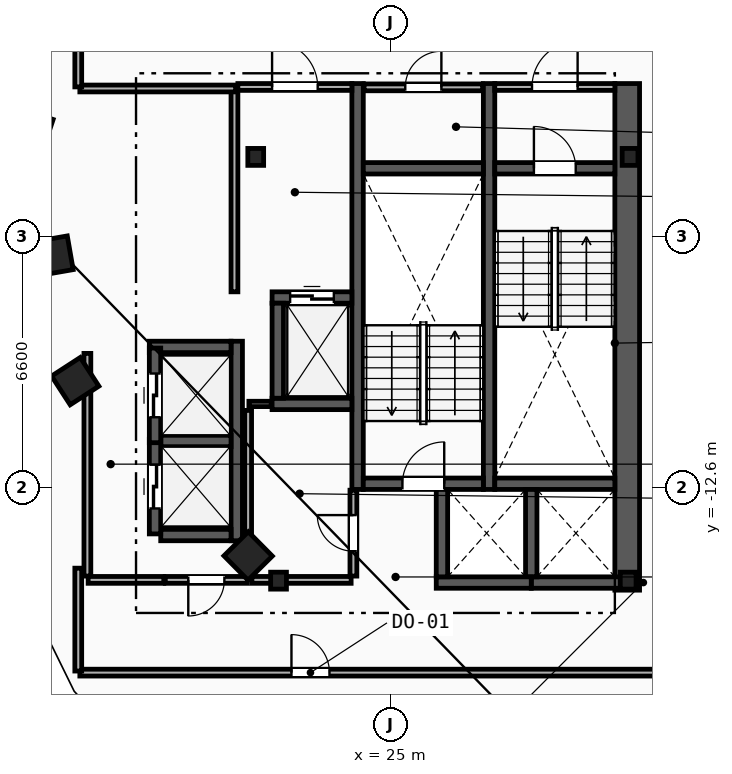
"""IFC4 building model, lengths in metres.
Left out: names, types, materials, properties, quantities, classifications, styles, units other than length and angle.
Written with IfcOpenShell. Run it as: python <this file> out.ifc"""

import sys

from ifc_helpers import new_model, si_unit, direction, frame, frame_2d, origin, origin_2d, place, context, subcontext, project, spatial, rectangle, i_section, extrude, element, fill, save


model = new_model("IFC4")
c1 = context("Model", 3, precision=1e-05, world=origin(), true_north=direction((0.0, 1.0)))
c2 = subcontext(c1, "Body", "Model", "MODEL_VIEW")
j1 = project(units=[si_unit("LENGTHUNIT", "METRE"), si_unit("PLANEANGLEUNIT", "RADIAN")], contexts=[c1])
p1 = place(None, origin())
s1 = spatial("IfcSite", under=j1, at=p1, CompositionType="ELEMENT")
p2 = place(p1, origin())
s2 = spatial("IfcBuilding", under=s1, at=p2, CompositionType="ELEMENT")
p3 = place(p2, frame((0.0, 0.0, 209.8)))
s3 = spatial("IfcBuildingStorey", under=s2, at=p3, CompositionType="ELEMENT", Elevation=209.8)
for number, where, z_axis, x_axis in (
    (1, (31.3, -3.9, 0.0), (0.0, 0.0, 1.0), (1.0, 0.0, 0.0)),
    (2, (21.45, -3.9, 0.0), (0.0, 0.0, 1.0), (1.0, 0.0, 0.0)),
    (3, (22.05, -15.05, 0.0), (0.0, 0.0, 1.0), (1.0, 0.0, 0.0)),
    (4, (31.25, -15.05, 0.0), (0.0, 0.0, 1.0), (1.0, 0.0, 0.0)),
):
    element("IfcColumn", number, at=place(p3, frame(where, z_axis=z_axis, x_axis=x_axis)), inside=s3, PredefinedType="COLUMN", context=c2, shape_type="SweptSolid", body=[
        extrude(i_section(OverallWidth=0.416, OverallDepth=0.446, WebThickness=0.039, FlangeThickness=0.063, FilletRadius=0.018, at=origin_2d()), origin(), (0.0, 0.0, 1.0), 3.6),
    ])
for number, where, z_axis, x_axis in (
    (5, (15.55, -3.2, 0.0), (0.0, 0.0, 1.0), (-0.315, -0.949, 0.0)),
    (6, (16.125, -6.5, 0.0), (0.0, 0.0, 1.0), (0.172, -0.985, 0.0)),
    (7, (16.7, -9.8, 0.0), (0.0, 0.0, 1.0), (0.544, -0.839, 0.0)),
    (8, (21.25, -14.4, 0.0), (0.0, 0.0, 1.0), (0.703, -0.711, 0.0)),
):
    element("IfcColumn", number, at=place(p3, frame(where, z_axis=z_axis, x_axis=x_axis)), inside=s3, PredefinedType="COLUMN", context=c2, shape_type="SweptSolid", body=[
        extrude(rectangle(XDim=0.9, YDim=0.9, at=origin_2d()), origin(), (0.0, 0.0, 1.0), 3.6),
    ])
p4 = place(p3, frame((31.225, -15.3, 0.0), z_axis=(0.0, 0.0, 1.0), x_axis=(0.0, 1.0, 0.0)))
e9 = element("IfcWall", 9, at=p4, inside=s3, PredefinedType="SHEAR", context=c2, shape_type="SweptSolid", body=[
    extrude(rectangle(XDim=13.33, YDim=0.65, at=frame_2d((6.665, 0.0))), origin(), (0.0, 0.0, 1.0), 3.34),
])
for number, where, z_axis, x_axis in (
    (10, (27.59, -12.65, 0.0), (0.0, 0.0, 1.0), (0.0, 1.0, 0.0)),
    (11, (24.13, -12.65, 0.0), (0.0, 0.0, 1.0), (0.0, 1.0, 0.0)),
):
    element("IfcWall", number, at=place(p3, frame(where, z_axis=z_axis, x_axis=x_axis)), inside=s3, PredefinedType="SHEAR", context=c2, shape_type="SweptSolid", body=[
        extrude(rectangle(XDim=10.68, YDim=0.3, at=frame_2d((5.34, 0.0))), origin(), (0.0, 0.0, 1.0), 3.34),
    ])
p5 = place(p3, frame((27.74, -4.2, 0.0), z_axis=(0.0, 0.0, 1.0), x_axis=(1.0, 0.0, 0.0)))
e12 = element("IfcWall", 12, at=p5, inside=s3, PredefinedType="SHEAR", context=c2, shape_type="SweptSolid", body=[
    extrude(rectangle(XDim=3.16, YDim=0.3, at=frame_2d((1.58, 0.0))), origin(), (0.0, 0.0, 1.0), 3.34),
])
p6 = place(p5, frame((1.03, 0.0, 0.0)))
e13 = element("IfcOpeningElement", 13, at=p6, cuts=e12, PredefinedType="OPENING", context=c2, shape_type="SweptSolid", body=[
    extrude(rectangle(XDim=1.1, YDim=2.15, at=frame_2d((0.55, 1.075))), frame((0.0, 0.16, 0.0), z_axis=(0.0, -1.0, 0.0), x_axis=(1.0, 0.0, 0.0)), (0.0, 0.0, 1.0), 0.32),
])
p7 = place(p3, frame((27.74, -12.5, 0.0), z_axis=(0.0, 0.0, 1.0), x_axis=(1.0, 0.0, 0.0)))
e14 = element("IfcWall", 14, at=p7, inside=s3, PredefinedType="SHEAR", context=c2, shape_type="SweptSolid", body=[
    extrude(rectangle(XDim=3.16, YDim=0.3, at=frame_2d((1.58, 0.0))), origin(), (0.0, 0.0, 1.0), 3.34),
])
p8 = place(p3, frame((24.28, -12.5, 0.0), z_axis=(0.0, 0.0, 1.0), x_axis=(1.0, 0.0, 0.0)))
e15 = element("IfcWall", 15, at=p8, inside=s3, PredefinedType="SHEAR", context=c2, shape_type="SweptSolid", body=[
    extrude(rectangle(XDim=3.16, YDim=0.3, at=frame_2d((1.58, 0.0))), origin(), (0.0, 0.0, 1.0), 3.34),
])
p9 = place(p8, frame((1.03, 0.0, 0.0)))
e16 = element("IfcOpeningElement", 16, at=p9, cuts=e15, PredefinedType="OPENING", context=c2, shape_type="SweptSolid", body=[
    extrude(rectangle(XDim=1.1, YDim=2.15, at=frame_2d((0.55, 1.075))), frame((0.0, 0.16, 0.0), z_axis=(0.0, -1.0, 0.0), x_axis=(1.0, 0.0, 0.0)), (0.0, 0.0, 1.0), 0.32),
])
p10 = place(p3, frame((24.28, -4.2, 0.0), z_axis=(0.0, 0.0, 1.0), x_axis=(1.0, 0.0, 0.0)))
e17 = element("IfcWall", 17, at=p10, inside=s3, PredefinedType="SHEAR", context=c2, shape_type="SweptSolid", body=[
    extrude(rectangle(XDim=3.16, YDim=0.3, at=frame_2d((1.58, 0.0))), origin(), (0.0, 0.0, 1.0), 3.34),
])
p11 = place(p3, frame((20.89, -7.45, 0.0), z_axis=(0.0, 0.0, 1.0), x_axis=(0.0, 1.0, 0.0)))
e18 = element("IfcWall", 18, at=p11, inside=s3, PredefinedType="PARTITIONING", context=c2, shape_type="SweptSolid", body=[
    extrude(rectangle(XDim=5.3, YDim=0.18, at=frame_2d((2.65, 0.0))), origin(), (0.0, 0.0, 1.0), 3.34),
])
p12 = place(p3, frame((20.98, -2.06, 0.0), z_axis=(0.0, 0.0, 1.0), x_axis=(1.0, 0.0, 0.0)))
e19 = element("IfcWall", 19, at=p12, inside=s3, PredefinedType="PARTITIONING", context=c2, shape_type="SweptSolid", body=[
    extrude(rectangle(XDim=3.0, YDim=0.18, at=frame_2d((1.5, 0.0))), origin(), (0.0, 0.0, 1.0), 3.34),
])
p13 = place(p12, frame((0.9, 0.0, 0.0)))
e20 = element("IfcOpeningElement", 20, at=p13, cuts=e19, PredefinedType="OPENING", context=c2, shape_type="SweptSolid", body=[
    extrude(rectangle(XDim=1.2, YDim=2.15, at=frame_2d((0.6, 1.075))), frame((0.0, 0.1, 0.0), z_axis=(0.0, -1.0, 0.0), x_axis=(1.0, 0.0, 0.0)), (0.0, 0.0, 1.0), 0.2),
])
p14 = place(p3, frame((27.74, -2.06, 0.0), z_axis=(0.0, 0.0, 1.0), x_axis=(1.0, 0.0, 0.0)))
e21 = element("IfcWall", 21, at=p14, inside=s3, PredefinedType="PARTITIONING", context=c2, shape_type="SweptSolid", body=[
    extrude(rectangle(XDim=3.16, YDim=0.18, at=frame_2d((1.58, 0.0))), origin(), (0.0, 0.0, 1.0), 3.34),
])
p15 = place(p14, frame((0.98, 0.0, 0.0)))
e22 = element("IfcOpeningElement", 22, at=p15, cuts=e21, PredefinedType="OPENING", context=c2, shape_type="SweptSolid", body=[
    extrude(rectangle(XDim=1.2, YDim=2.15, at=frame_2d((0.6, 1.075))), frame((0.0, 0.1, 0.0), z_axis=(0.0, -1.0, 0.0), x_axis=(1.0, 0.0, 0.0)), (0.0, 0.0, 1.0), 0.2),
])
p16 = place(p3, frame((21.88, -7.6, 0.0), z_axis=(0.0, 0.0, 1.0), x_axis=(1.0, 0.0, 0.0)))
e23 = element("IfcWall", 23, at=p16, inside=s3, PredefinedType="SHEAR", context=c2, shape_type="SweptSolid", body=[
    extrude(rectangle(XDim=2.1, YDim=0.3, at=frame_2d((1.05, 0.0))), origin(), (0.0, 0.0, 1.0), 3.34),
])
p17 = place(p16, frame((0.475, 0.0, 0.0)))
e24 = element("IfcOpeningElement", 24, at=p17, cuts=e23, PredefinedType="OPENING", context=c2, shape_type="SweptSolid", body=[
    extrude(rectangle(XDim=1.15, YDim=2.2, at=frame_2d((0.575, 1.1))), frame((0.0, 0.16, 0.0), z_axis=(0.0, -1.0, 0.0), x_axis=(1.0, 0.0, 0.0)), (0.0, 0.0, 1.0), 0.32),
])
p18 = place(p3, frame((21.88, -10.4, 0.0), z_axis=(0.0, 0.0, 1.0), x_axis=(1.0, 0.0, 0.0)))
e25 = element("IfcWall", 25, at=p18, inside=s3, PredefinedType="SHEAR", context=c2, shape_type="SweptSolid", body=[
    extrude(rectangle(XDim=2.1, YDim=0.3, at=frame_2d((1.05, 0.0))), origin(), (0.0, 0.0, 1.0), 3.34),
])
for number, where, z_axis, x_axis in (
    (26, (22.03, -10.25, 0.0), (0.0, 0.0, 1.0), (0.0, 1.0, 0.0)),
    (27, (28.7, -15.1, 0.0), (0.0, 0.0, 1.0), (1.0, 0.0, 0.0)),
):
    element("IfcWall", number, at=place(p3, frame(where, z_axis=z_axis, x_axis=x_axis)), inside=s3, PredefinedType="SHEAR", context=c2, shape_type="SweptSolid", body=[
        extrude(rectangle(XDim=2.5, YDim=0.3, at=frame_2d((1.25, 0.0))), origin(), (0.0, 0.0, 1.0), 3.34),
    ])
p19 = place(p3, frame((28.7, -14.95, 0.0), z_axis=(0.0, 0.0, 1.0), x_axis=(0.0, 1.0, 0.0)))
e28 = element("IfcWall", 28, at=p19, inside=s3, PredefinedType="SHEAR", context=c2, shape_type="SweptSolid", body=[
    extrude(rectangle(XDim=2.3, YDim=0.3, at=frame_2d((1.15, 0.0))), origin(), (0.0, 0.0, 1.0), 3.34),
])
p20 = place(p3, frame((26.2, -15.1, 0.0), z_axis=(0.0, 0.0, 1.0), x_axis=(1.0, 0.0, 0.0)))
e29 = element("IfcWall", 29, at=p20, inside=s3, PredefinedType="SHEAR", context=c2, shape_type="SweptSolid", body=[
    extrude(rectangle(XDim=2.5, YDim=0.3, at=frame_2d((1.25, 0.0))), origin(), (0.0, 0.0, 1.0), 3.34),
])
p21 = place(p3, frame((26.35, -14.95, 0.0), z_axis=(0.0, 0.0, 1.0), x_axis=(0.0, 1.0, 0.0)))
e30 = element("IfcWall", 30, at=p21, inside=s3, PredefinedType="SHEAR", context=c2, shape_type="SweptSolid", body=[
    extrude(rectangle(XDim=2.3, YDim=0.3, at=frame_2d((1.15, 0.0))), origin(), (0.0, 0.0, 1.0), 3.34),
])
p22 = place(p3, frame((20.95, -14.0, 0.0), z_axis=(0.0, 0.0, 1.0), x_axis=(0.0, 1.0, 0.0)))
e31 = element("IfcWall", 31, at=p22, inside=s3, PredefinedType="SHEAR", context=c2, shape_type="SweptSolid", body=[
    extrude(rectangle(XDim=5.25, YDim=0.3, at=frame_2d((2.625, 0.0))), origin(), (0.0, 0.0, 1.0), 3.34),
])
p23 = place(p3, frame((18.95, -13.85, 0.0), z_axis=(0.0, 0.0, 1.0), x_axis=(1.0, 0.0, 0.0)))
e32 = element("IfcWall", 32, at=p23, inside=s3, PredefinedType="SHEAR", context=c2, shape_type="SweptSolid", body=[
    extrude(rectangle(XDim=1.85, YDim=0.3, at=frame_2d((0.925, 0.0))), origin(), (0.0, 0.0, 1.0), 3.34),
])
p24 = place(p3, frame((18.65, -8.9, 0.0), z_axis=(0.0, 0.0, 1.0), x_axis=(1.0, 0.0, 0.0)))
e33 = element("IfcWall", 33, at=p24, inside=s3, PredefinedType="SHEAR", context=c2, shape_type="SweptSolid", body=[
    extrude(rectangle(XDim=2.15, YDim=0.3, at=frame_2d((1.075, 0.0))), origin(), (0.0, 0.0, 1.0), 3.34),
])
p25 = place(p3, frame((18.95, -11.375, 0.0), z_axis=(0.0, 0.0, 1.0), x_axis=(1.0, 0.0, 0.0)))
e34 = element("IfcWall", 34, at=p25, inside=s3, PredefinedType="SHEAR", context=c2, shape_type="SweptSolid", body=[
    extrude(rectangle(XDim=1.85, YDim=0.3, at=frame_2d((0.925, 0.0))), origin(), (0.0, 0.0, 1.0), 3.34),
])
p26 = place(p3, frame((18.8, -13.82, 0.0), z_axis=(0.0, 0.0, 1.0), x_axis=(0.0, 1.0, 0.0)))
e35 = element("IfcWall", 35, at=p26, inside=s3, PredefinedType="SHEAR", context=c2, shape_type="SweptSolid", body=[
    extrude(rectangle(XDim=2.49, YDim=0.3, at=frame_2d((1.245, 0.0))), origin(), (0.0, 0.0, 1.0), 3.34),
])
p27 = place(p26, frame((0.67, 0.0, 0.0)))
e36 = element("IfcOpeningElement", 36, at=p27, cuts=e35, PredefinedType="OPENING", context=c2, shape_type="SweptSolid", body=[
    extrude(rectangle(XDim=1.15, YDim=2.2, at=frame_2d((0.575, 1.1))), frame((0.0, 0.16, 0.0), z_axis=(0.0, -1.0, 0.0), x_axis=(1.0, 0.0, 0.0)), (0.0, 0.0, 1.0), 0.32),
])
p28 = place(p3, frame((18.8, -11.42, 0.0), z_axis=(0.0, 0.0, 1.0), x_axis=(0.0, 1.0, 0.0)))
e37 = element("IfcWall", 37, at=p28, inside=s3, PredefinedType="SHEAR", context=c2, shape_type="SweptSolid", body=[
    extrude(rectangle(XDim=2.49, YDim=0.3, at=frame_2d((1.245, 0.0))), origin(), (0.0, 0.0, 1.0), 3.34),
])
p29 = place(p28, frame((0.67, 0.0, 0.0)))
e38 = element("IfcOpeningElement", 38, at=p29, cuts=e37, PredefinedType="OPENING", context=c2, shape_type="SweptSolid", body=[
    extrude(rectangle(XDim=1.15, YDim=2.2, at=frame_2d((0.575, 1.1))), frame((0.0, 0.16, 0.0), z_axis=(0.0, -1.0, 0.0), x_axis=(1.0, 0.0, 0.0)), (0.0, 0.0, 1.0), 0.32),
])
p30 = place(p3, frame((17.02, -14.93, 0.0), z_axis=(0.0, 0.0, 1.0), x_axis=(0.0, 1.0, 0.0)))
e39 = element("IfcWall", 39, at=p30, inside=s3, PredefinedType="PARTITIONING", context=c2, shape_type="SweptSolid", body=[
    extrude(rectangle(XDim=5.86, YDim=0.18, at=frame_2d((2.93, 0.0))), origin(), (0.0, 0.0, 1.0), 3.34),
])
p31 = place(p3, frame((17.04, -15.03, 0.0), z_axis=(0.0, 0.0, 1.0), x_axis=(1.0, 0.0, 0.0)))
e40 = element("IfcWall", 40, at=p31, inside=s3, PredefinedType="PARTITIONING", context=c2, shape_type="SweptSolid", body=[
    extrude(rectangle(XDim=1.99, YDim=0.18, at=frame_2d((0.995, 0.0))), origin(), (0.0, 0.0, 1.0), 3.34),
])
p32 = place(p3, frame((21.23, -15.03, 0.0), z_axis=(0.0, 0.0, 1.0), x_axis=(-1.0, 0.0, 0.0)))
e41 = element("IfcWall", 41, at=p32, inside=s3, PredefinedType="PARTITIONING", context=c2, shape_type="SweptSolid", body=[
    extrude(rectangle(XDim=2.16, YDim=0.18, at=frame_2d((1.08, 0.0))), origin(), (0.0, 0.0, 1.0), 3.34),
])
p33 = place(p32, frame((0.605, 0.0, 0.0)))
e42 = element("IfcOpeningElement", 42, at=p33, cuts=e41, PredefinedType="OPENING", context=c2, shape_type="SweptSolid", body=[
    extrude(rectangle(XDim=0.95, YDim=2.1, at=frame_2d((0.475, 1.05))), frame((0.0, 0.1, 0.0), z_axis=(0.0, -1.0, 0.0), x_axis=(1.0, 0.0, 0.0)), (0.0, 0.0, 1.0), 0.2),
])
p34 = place(p3, frame((21.27, -10.4, 0.0), z_axis=(0.0, 0.0, 1.0), x_axis=(1.0, 0.0, 0.0)))
e43 = element("IfcWall", 43, at=p34, inside=s3, PredefinedType="PARTITIONING", context=c2, shape_type="SweptSolid", body=[
    extrude(rectangle(XDim=0.59, YDim=0.14, at=frame_2d((0.295, 0.0))), origin(), (0.0, 0.0, 1.0), 3.34),
])
p35 = place(p3, frame((21.25, -14.93, 0.0), z_axis=(0.0, 0.0, 1.0), x_axis=(0.0, 1.0, 0.0)))
e44 = element("IfcWall", 44, at=p35, inside=s3, PredefinedType="PARTITIONING", context=c2, shape_type="SweptSolid", body=[
    extrude(rectangle(XDim=4.36, YDim=0.18, at=frame_2d((2.18, 0.0))), origin(), (0.0, 0.0, 1.0), 3.34),
])
p36 = place(p3, frame((21.35, -15.03, 0.0), z_axis=(0.0, 0.0, 1.0), x_axis=(1.0, 0.0, 0.0)))
e45 = element("IfcWall", 45, at=p36, inside=s3, PredefinedType="PARTITIONING", context=c2, shape_type="SweptSolid", body=[
    extrude(rectangle(XDim=2.61, YDim=0.18, at=frame_2d((1.305, 0.0))), origin(), (0.0, 0.0, 1.0), 2.413),
])
p37 = place(p3, frame((24.3, -2.07, 0.0), z_axis=(0.0, 0.0, 1.0), x_axis=(1.0, 0.0, 0.0)))
e46 = element("IfcWall", 46, at=p37, inside=s3, PredefinedType="PARTITIONING", context=c2, shape_type="SweptSolid", body=[
    extrude(rectangle(XDim=3.12, YDim=0.18, at=frame_2d((1.56, 0.0))), origin(), (0.0, 0.0, 1.0), 3.34),
])
p38 = place(p37, frame((1.085, 0.0, 0.0)))
e47 = element("IfcOpeningElement", 47, at=p38, cuts=e46, PredefinedType="OPENING", context=c2, shape_type="SweptSolid", body=[
    extrude(rectangle(XDim=0.95, YDim=2.1, at=frame_2d((0.475, 1.05))), frame((0.0, 0.1, 0.0), z_axis=(0.0, -1.0, 0.0), x_axis=(1.0, 0.0, 0.0)), (0.0, 0.0, 1.0), 0.2),
])
p39 = place(p3, frame((24.02, -14.93, 0.0), z_axis=(0.0, 0.0, 1.0), x_axis=(0.0, 1.0, 0.0)))
e48 = element("IfcWall", 48, at=p39, inside=s3, PredefinedType="PARTITIONING", context=c2, shape_type="SweptSolid", body=[
    extrude(rectangle(XDim=2.26, YDim=0.18, at=frame_2d((1.13, 0.0))), origin(), (0.0, 0.0, 1.0), 3.34),
])
p40 = place(p39, frame((0.655, 0.0, 0.0)))
e49 = element("IfcOpeningElement", 49, at=p40, cuts=e48, PredefinedType="OPENING", context=c2, shape_type="SweptSolid", body=[
    extrude(rectangle(XDim=0.95, YDim=2.1, at=frame_2d((0.475, 1.05))), frame((0.0, 0.1, 0.0), z_axis=(0.0, -1.0, 0.0), x_axis=(1.0, 0.0, 0.0)), (0.0, 0.0, 1.0), 0.2),
])
p41 = place(p3, frame((16.822, -17.47, 0.0), z_axis=(0.0, 0.0, 1.0), x_axis=(1.0, 0.0, 0.0)))
e50 = element("IfcWall", 50, at=p41, inside=s3, PredefinedType="PARTITIONING", context=c2, shape_type="SweptSolid", body=[
    extrude(rectangle(XDim=16.807, YDim=0.18, at=frame_2d((8.403, 0.0))), origin(), (0.0, 0.0, 1.0), 3.34),
])
p42 = place(p41, frame((5.569, 0.0, 0.0)))
e51 = element("IfcOpeningElement", 51, at=p42, cuts=e50, PredefinedType="OPENING", context=c2, shape_type="SweptSolid", body=[
    extrude(rectangle(XDim=1.0, YDim=2.15, at=frame_2d((0.5, 1.075))), frame((0.0, 0.1, 0.0), z_axis=(0.0, -1.0, 0.0), x_axis=(1.0, 0.0, 0.0)), (0.0, 0.0, 1.0), 0.2),
])
p43 = place(p3, frame((16.822, -2.1, 0.0), z_axis=(0.0, 0.0, 1.0), x_axis=(1.0, 0.0, 0.0)))
e52 = element("IfcWall", 52, at=p43, inside=s3, PredefinedType="PARTITIONING", context=c2, shape_type="SweptSolid", body=[
    extrude(rectangle(XDim=4.098, YDim=0.18, at=frame_2d((2.049, 0.0))), origin(), (0.0, 0.0, 1.0), 3.34),
])
p44 = place(p3, frame((16.78, -14.721, 0.0), z_axis=(0.0, 0.0, 1.0), x_axis=(0.0, -1.0, 0.0)))
e53 = element("IfcWall", 53, at=p44, inside=s3, PredefinedType="PARTITIONING", context=c2, shape_type="SweptSolid", body=[
    extrude(rectangle(XDim=2.707, YDim=0.18, at=frame_2d((1.354, 0.0))), origin(), (0.0, 0.0, 1.0), 3.34),
])
p45 = place(p3, frame((16.78, 0.329, 0.0), z_axis=(0.0, 0.0, 1.0), x_axis=(0.0, -1.0, 0.0)))
e54 = element("IfcWall", 54, at=p45, inside=s3, PredefinedType="PARTITIONING", context=c2, shape_type="SweptSolid", body=[
    extrude(rectangle(XDim=2.387, YDim=0.18, at=frame_2d((1.194, 0.0))), origin(), (0.0, 0.0, 1.0), 3.34),
])
p46 = place(p6, origin())
e55 = element("IfcDoor", 55, at=p46, inside=s3, OperationType="SINGLE_SWING_LEFT", PredefinedType="DOOR", context=c2, shape_type="SweptSolid", body=[
    extrude(rectangle(XDim=1.1, YDim=2.15, at=frame_2d((0.55, 1.075))), frame((0.0, 0.025, 0.0), z_axis=(0.0, -1.0, 0.0), x_axis=(1.0, 0.0, 0.0)), (0.0, 0.0, 1.0), 0.05),
])
fill(e13, e55)
p47 = place(p9, origin())
e56 = element("IfcDoor", 56, at=p47, inside=s3, OperationType="SINGLE_SWING_RIGHT", PredefinedType="DOOR", context=c2, shape_type="SweptSolid", body=[
    extrude(rectangle(XDim=1.1, YDim=2.15, at=frame_2d((0.55, 1.075))), frame((0.0, 0.025, 0.0), z_axis=(0.0, -1.0, 0.0), x_axis=(1.0, 0.0, 0.0)), (0.0, 0.0, 1.0), 0.05),
])
fill(e16, e56)
p48 = place(p13, origin())
e57 = element("IfcDoor", 57, at=p48, inside=s3, OperationType="SINGLE_SWING_LEFT", PredefinedType="DOOR", context=c2, shape_type="SweptSolid", body=[
    extrude(rectangle(XDim=1.2, YDim=2.15, at=frame_2d((0.6, 1.075))), frame((0.0, 0.025, 0.0), z_axis=(0.0, -1.0, 0.0), x_axis=(1.0, 0.0, 0.0)), (0.0, 0.0, 1.0), 0.05),
])
fill(e20, e57)
p49 = place(p15, origin())
e58 = element("IfcDoor", 58, at=p49, inside=s3, OperationType="SINGLE_SWING_RIGHT", PredefinedType="DOOR", context=c2, shape_type="SweptSolid", body=[
    extrude(rectangle(XDim=1.2, YDim=2.15, at=frame_2d((0.6, 1.075))), frame((0.0, 0.025, 0.0), z_axis=(0.0, -1.0, 0.0), x_axis=(1.0, 0.0, 0.0)), (0.0, 0.0, 1.0), 0.05),
])
fill(e22, e58)
p50 = place(p17, origin())
e59 = element("IfcDoor", 59, at=p50, inside=s3, OperationType="SLIDING_TO_LEFT", PredefinedType="TRAPDOOR", context=c2, shape_type="SweptSolid", body=[
    extrude(rectangle(XDim=1.15, YDim=2.2, at=frame_2d((0.575, 1.1))), frame((0.0, 0.025, 0.0), z_axis=(0.0, -1.0, 0.0), x_axis=(1.0, 0.0, 0.0)), (0.0, 0.0, 1.0), 0.05),
])
fill(e24, e59)
p51 = place(p27, origin())
e60 = element("IfcDoor", 60, at=p51, inside=s3, OperationType="SLIDING_TO_LEFT", PredefinedType="TRAPDOOR", context=c2, shape_type="SweptSolid", body=[
    extrude(rectangle(XDim=1.15, YDim=2.2, at=frame_2d((0.575, 1.1))), frame((0.0, 0.025, 0.0), z_axis=(0.0, -1.0, 0.0), x_axis=(1.0, 0.0, 0.0)), (0.0, 0.0, 1.0), 0.05),
])
fill(e36, e60)
p52 = place(p29, origin())
e61 = element("IfcDoor", 61, at=p52, inside=s3, OperationType="SLIDING_TO_LEFT", PredefinedType="TRAPDOOR", context=c2, shape_type="SweptSolid", body=[
    extrude(rectangle(XDim=1.15, YDim=2.2, at=frame_2d((0.575, 1.1))), frame((0.0, 0.025, 0.0), z_axis=(0.0, -1.0, 0.0), x_axis=(1.0, 0.0, 0.0)), (0.0, 0.0, 1.0), 0.05),
])
fill(e38, e61)
p53 = place(p42, origin())
e62 = element("IfcDoor", 62, at=p53, inside=s3, OperationType="SINGLE_SWING_LEFT", PredefinedType="DOOR", context=c2, shape_type="SweptSolid", body=[
    extrude(rectangle(XDim=1.0, YDim=2.15, at=frame_2d((0.5, 1.075))), frame((0.0, 0.025, 0.0), z_axis=(0.0, -1.0, 0.0), x_axis=(1.0, 0.0, 0.0)), (0.0, 0.0, 1.0), 0.05),
])
fill(e51, e62)
p54 = place(p38, origin())
e63 = element("IfcDoor", 63, at=p54, inside=s3, OperationType="SINGLE_SWING_RIGHT", PredefinedType="DOOR", context=c2, shape_type="SweptSolid", body=[
    extrude(rectangle(XDim=0.95, YDim=2.1, at=frame_2d((0.475, 1.05))), frame((0.0, 0.025, 0.0), z_axis=(0.0, -1.0, 0.0), x_axis=(1.0, 0.0, 0.0)), (0.0, 0.0, 1.0), 0.05),
])
fill(e47, e63)
p55 = place(p40, origin())
e64 = element("IfcDoor", 64, at=p55, inside=s3, OperationType="SINGLE_SWING_RIGHT", PredefinedType="DOOR", context=c2, shape_type="SweptSolid", body=[
    extrude(rectangle(XDim=0.95, YDim=2.1, at=frame_2d((0.475, 1.05))), frame((0.0, 0.025, 0.0), z_axis=(0.0, -1.0, 0.0), x_axis=(1.0, 0.0, 0.0)), (0.0, 0.0, 1.0), 0.05),
])
fill(e49, e64)
p56 = place(p33, origin())
e65 = element("IfcDoor", 65, at=p56, inside=s3, OperationType="SINGLE_SWING_RIGHT", PredefinedType="DOOR", context=c2, shape_type="SweptSolid", body=[
    extrude(rectangle(XDim=0.95, YDim=2.1, at=frame_2d((0.475, 1.05))), frame((0.0, 0.025, 0.0), z_axis=(0.0, -1.0, 0.0), x_axis=(1.0, 0.0, 0.0)), (0.0, 0.0, 1.0), 0.05),
])
fill(e42, e65)
save(model, sys.argv[1])
